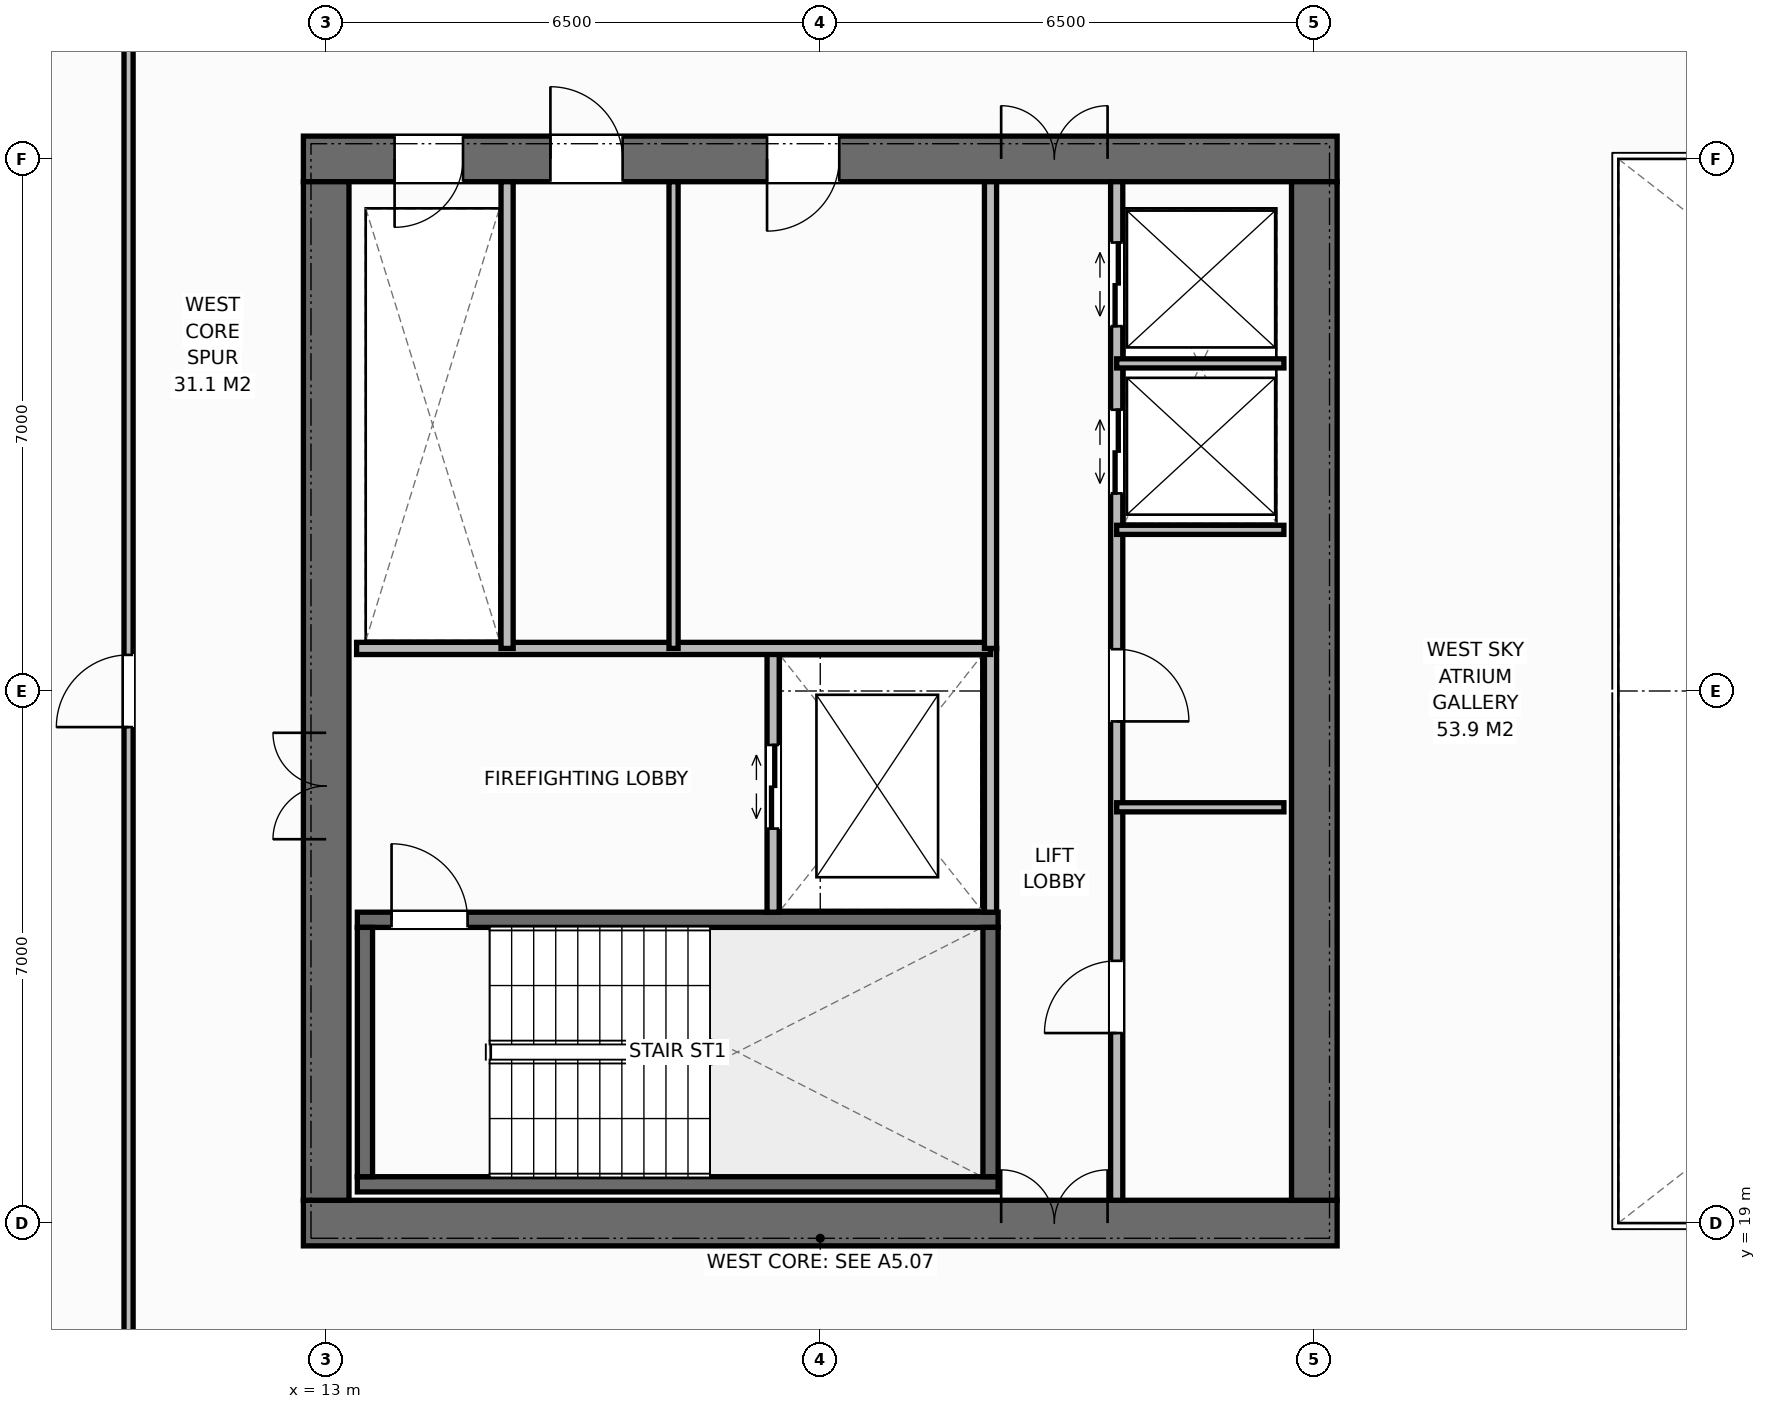
"""IFC4 building model, lengths in metres.
Left out: names, types, materials, properties, quantities, classifications, styles, units other than length and angle.
Written with IfcOpenShell. Run it as: python <this file> out.ifc"""

import sys

from ifc_helpers import new_model, si_unit, direction, frame, frame_2d, origin, place, context, subcontext, project, spatial, rectangle, extrude, element, fill, save


model = new_model("IFC4")
c1 = context("Model", 3, precision=1e-05, world=origin(), true_north=direction((0.0, 1.0)))
c2 = subcontext(c1, "Body", "Model", "MODEL_VIEW")
j1 = project(units=[si_unit("LENGTHUNIT", "METRE"), si_unit("PLANEANGLEUNIT", "RADIAN")], contexts=[c1])
p1 = place(None, origin())
s1 = spatial("IfcSite", under=j1, at=p1, CompositionType="ELEMENT")
p2 = place(p1, origin())
s2 = spatial("IfcBuilding", under=s1, at=p2, CompositionType="ELEMENT")
p3 = place(p2, frame((0.0, 0.0, 170.8)))
s3 = spatial("IfcBuildingStorey", under=s2, at=p3, CompositionType="ELEMENT", Elevation=170.8)
p4 = place(p3, frame((12.7, 19.0, 0.0), z_axis=(0.0, 0.0, 1.0), x_axis=(1.0, 0.0, 0.0)))
e1 = element("IfcWall", 1, at=p4, inside=s3, PredefinedType="SHEAR", context=c2, shape_type="SweptSolid", body=[
    extrude(rectangle(XDim=13.6, YDim=0.6, at=frame_2d((6.8, 0.0))), origin(), (0.0, 0.0, 1.0), 3.8),
])
p5 = place(p4, frame((9.18, 0.0, 0.0)))
e2 = element("IfcOpeningElement", 2, at=p5, cuts=e1, PredefinedType="OPENING", context=c2, shape_type="SweptSolid", body=[
    extrude(rectangle(XDim=1.4, YDim=2.2, at=frame_2d((0.7, 1.1))), frame((0.0, 0.31, 0.0), z_axis=(0.0, -1.0, 0.0), x_axis=(1.0, 0.0, 0.0)), (0.0, 0.0, 1.0), 0.62),
])
p6 = place(p3, frame((12.7, 33.0, 0.0), z_axis=(0.0, 0.0, 1.0), x_axis=(1.0, 0.0, 0.0)))
e3 = element("IfcWall", 3, at=p6, inside=s3, PredefinedType="SHEAR", context=c2, shape_type="SweptSolid", body=[
    extrude(rectangle(XDim=13.6, YDim=0.6, at=frame_2d((6.8, 0.0))), origin(), (0.0, 0.0, 1.0), 3.8),
])
p7 = place(p6, frame((1.2, 0.0, 0.0)))
e4 = element("IfcOpeningElement", 4, at=p7, cuts=e3, PredefinedType="OPENING", context=c2, shape_type="SweptSolid", body=[
    extrude(rectangle(XDim=0.9, YDim=2.15, at=frame_2d((0.45, 1.075))), frame((0.0, 0.31, 0.0), z_axis=(0.0, -1.0, 0.0), x_axis=(1.0, 0.0, 0.0)), (0.0, 0.0, 1.0), 0.62),
])
p8 = place(p6, frame((3.25, 0.0, 0.0)))
e5 = element("IfcOpeningElement", 5, at=p8, cuts=e3, PredefinedType="OPENING", context=c2, shape_type="SweptSolid", body=[
    extrude(rectangle(XDim=0.95, YDim=2.15, at=frame_2d((0.475, 1.075))), frame((0.0, 0.31, 0.0), z_axis=(0.0, -1.0, 0.0), x_axis=(1.0, 0.0, 0.0)), (0.0, 0.0, 1.0), 0.62),
])
p9 = place(p6, frame((6.1, 0.0, 0.0)))
e6 = element("IfcOpeningElement", 6, at=p9, cuts=e3, PredefinedType="OPENING", context=c2, shape_type="SweptSolid", body=[
    extrude(rectangle(XDim=0.95, YDim=2.15, at=frame_2d((0.475, 1.075))), frame((0.0, 0.31, 0.0), z_axis=(0.0, -1.0, 0.0), x_axis=(1.0, 0.0, 0.0)), (0.0, 0.0, 1.0), 0.62),
])
p10 = place(p6, frame((9.18, 0.0, 0.0)))
e7 = element("IfcOpeningElement", 7, at=p10, cuts=e3, PredefinedType="OPENING", context=c2, shape_type="SweptSolid", body=[
    extrude(rectangle(XDim=1.4, YDim=2.2, at=frame_2d((0.7, 1.1))), frame((0.0, 0.31, 0.0), z_axis=(0.0, -1.0, 0.0), x_axis=(1.0, 0.0, 0.0)), (0.0, 0.0, 1.0), 0.62),
])
p11 = place(p3, frame((13.0, 19.3, 0.0), z_axis=(0.0, 0.0, 1.0), x_axis=(0.0, 1.0, 0.0)))
e8 = element("IfcWall", 8, at=p11, inside=s3, PredefinedType="SHEAR", context=c2, shape_type="SweptSolid", body=[
    extrude(rectangle(XDim=13.4, YDim=0.6, at=frame_2d((6.7, 0.0))), origin(), (0.0, 0.0, 1.0), 3.8),
])
p12 = place(p11, frame((4.75, 0.0, 0.0)))
e9 = element("IfcOpeningElement", 9, at=p12, cuts=e8, PredefinedType="OPENING", context=c2, shape_type="SweptSolid", body=[
    extrude(rectangle(XDim=1.4, YDim=2.2, at=frame_2d((0.7, 1.1))), frame((0.0, 0.31, 0.0), z_axis=(0.0, -1.0, 0.0), x_axis=(1.0, 0.0, 0.0)), (0.0, 0.0, 1.0), 0.62),
])
p13 = place(p3, frame((26.0, 19.3, 0.0), z_axis=(0.0, 0.0, 1.0), x_axis=(0.0, 1.0, 0.0)))
e10 = element("IfcWall", 10, at=p13, inside=s3, PredefinedType="SHEAR", context=c2, shape_type="SweptSolid", body=[
    extrude(rectangle(XDim=13.4, YDim=0.6, at=frame_2d((6.7, 0.0))), origin(), (0.0, 0.0, 1.0), 3.8),
])
p14 = place(p3, frame((13.41, 19.51, 0.0), z_axis=(0.0, 0.0, 1.0), x_axis=(1.0, 0.0, 0.0)))
e11 = element("IfcWall", 11, at=p14, inside=s3, PredefinedType="SHEAR", context=c2, shape_type="SweptSolid", body=[
    extrude(rectangle(XDim=8.43, YDim=0.2, at=frame_2d((4.215, 0.0))), origin(), (0.0, 0.0, 1.0), 3.8),
])
p15 = place(p3, frame((13.41, 22.99, 0.0), z_axis=(0.0, 0.0, 1.0), x_axis=(1.0, 0.0, 0.0)))
e12 = element("IfcWall", 12, at=p15, inside=s3, PredefinedType="SHEAR", context=c2, shape_type="SweptSolid", body=[
    extrude(rectangle(XDim=8.43, YDim=0.2, at=frame_2d((4.215, 0.0))), origin(), (0.0, 0.0, 1.0), 3.8),
])
p16 = place(p15, frame((0.45, 0.0, 0.0)))
e13 = element("IfcOpeningElement", 13, at=p16, cuts=e12, PredefinedType="OPENING", context=c2, shape_type="SweptSolid", body=[
    extrude(rectangle(XDim=1.0, YDim=2.15, at=frame_2d((0.5, 1.075))), frame((0.0, 0.11, 0.0), z_axis=(0.0, -1.0, 0.0), x_axis=(1.0, 0.0, 0.0)), (0.0, 0.0, 1.0), 0.22),
])
for number, where, z_axis, x_axis in (
    (14, (13.51, 19.61, 0.0), (0.0, 0.0, 1.0), (0.0, 1.0, 0.0)),
    (15, (21.74, 19.61, 0.0), (0.0, 0.0, 1.0), (0.0, 1.0, 0.0)),
):
    element("IfcWall", number, at=place(p3, frame(where, z_axis=z_axis, x_axis=x_axis)), inside=s3, PredefinedType="SHEAR", context=c2, shape_type="SweptSolid", body=[
        extrude(rectangle(XDim=3.28, YDim=0.2, at=frame_2d((1.64, 0.0))), origin(), (0.0, 0.0, 1.0), 3.8),
    ])
p17 = place(p3, frame((21.74, 23.09, 0.0), z_axis=(0.0, 0.0, 1.0), x_axis=(0.0, 1.0, 0.0)))
e16 = element("IfcWall", 16, at=p17, inside=s3, PredefinedType="STANDARD", context=c2, shape_type="SweptSolid", body=[
    extrude(rectangle(XDim=3.47, YDim=0.16, at=frame_2d((1.735, 0.0))), origin(), (0.0, 0.0, 1.0), 3.572),
])
p18 = place(p3, frame((18.88, 23.09, 0.0), z_axis=(0.0, 0.0, 1.0), x_axis=(0.0, 1.0, 0.0)))
e17 = element("IfcWall", 17, at=p18, inside=s3, PredefinedType="STANDARD", context=c2, shape_type="SweptSolid", body=[
    extrude(rectangle(XDim=3.47, YDim=0.16, at=frame_2d((1.735, 0.0))), origin(), (0.0, 0.0, 1.0), 3.572),
])
p19 = place(p18, frame((1.1, 0.0, 0.0)))
e18 = element("IfcOpeningElement", 18, at=p19, cuts=e17, PredefinedType="OPENING", context=c2, shape_type="SweptSolid", body=[
    extrude(rectangle(XDim=1.1, YDim=2.2, at=frame_2d((0.55, 1.1))), frame((0.0, 0.09, 0.0), z_axis=(0.0, -1.0, 0.0), x_axis=(1.0, 0.0, 0.0)), (0.0, 0.0, 1.0), 0.18),
])
p20 = place(p3, frame((13.4, 26.56, 0.0), z_axis=(0.0, 0.0, 1.0), x_axis=(1.0, 0.0, 0.0)))
e19 = element("IfcWall", 19, at=p20, inside=s3, PredefinedType="STANDARD", context=c2, shape_type="SweptSolid", body=[
    extrude(rectangle(XDim=8.34, YDim=0.16, at=frame_2d((4.17, 0.0))), origin(), (0.0, 0.0, 1.0), 3.572),
])
p21 = place(p3, frame((15.38, 26.56, 0.0), z_axis=(0.0, 0.0, 1.0), x_axis=(0.0, 1.0, 0.0)))
e20 = element("IfcWall", 20, at=p21, inside=s3, PredefinedType="STANDARD", context=c2, shape_type="SweptSolid", body=[
    extrude(rectangle(XDim=6.14, YDim=0.16, at=frame_2d((3.07, 0.0))), origin(), (0.0, 0.0, 1.0), 3.572),
])
p22 = place(p3, frame((17.57, 26.56, 0.0), z_axis=(0.0, 0.0, 1.0), x_axis=(0.0, 1.0, 0.0)))
e21 = element("IfcWall", 21, at=p22, inside=s3, PredefinedType="PARTITIONING", context=c2, shape_type="SweptSolid", body=[
    extrude(rectangle(XDim=6.14, YDim=0.12, at=frame_2d((3.07, 0.0))), origin(), (0.0, 0.0, 1.0), 3.572),
])
p23 = place(p3, frame((21.74, 26.56, 0.0), z_axis=(0.0, 0.0, 1.0), x_axis=(0.0, 1.0, 0.0)))
e22 = element("IfcWall", 22, at=p23, inside=s3, PredefinedType="STANDARD", context=c2, shape_type="SweptSolid", body=[
    extrude(rectangle(XDim=6.14, YDim=0.16, at=frame_2d((3.07, 0.0))), origin(), (0.0, 0.0, 1.0), 3.572),
])
p24 = place(p3, frame((23.4, 19.3, 0.0), z_axis=(0.0, 0.0, 1.0), x_axis=(0.0, 1.0, 0.0)))
e23 = element("IfcWall", 23, at=p24, inside=s3, PredefinedType="STANDARD", context=c2, shape_type="SweptSolid", body=[
    extrude(rectangle(XDim=13.4, YDim=0.16, at=frame_2d((6.7, 0.0))), origin(), (0.0, 0.0, 1.0), 3.572),
])
p25 = place(p24, frame((2.2, 0.0, 0.0)))
e24 = element("IfcOpeningElement", 24, at=p25, cuts=e23, PredefinedType="OPENING", context=c2, shape_type="SweptSolid", body=[
    extrude(rectangle(XDim=0.95, YDim=2.15, at=frame_2d((0.475, 1.075))), frame((0.0, 0.09, 0.0), z_axis=(0.0, -1.0, 0.0), x_axis=(1.0, 0.0, 0.0)), (0.0, 0.0, 1.0), 0.18),
])
p26 = place(p24, frame((6.3, 0.0, 0.0)))
e25 = element("IfcOpeningElement", 25, at=p26, cuts=e23, PredefinedType="OPENING", context=c2, shape_type="SweptSolid", body=[
    extrude(rectangle(XDim=0.95, YDim=2.15, at=frame_2d((0.475, 1.075))), frame((0.0, 0.09, 0.0), z_axis=(0.0, -1.0, 0.0), x_axis=(1.0, 0.0, 0.0)), (0.0, 0.0, 1.0), 0.18),
])
p27 = place(p24, frame((9.3, 0.0, 0.0)))
e26 = element("IfcOpeningElement", 26, at=p27, cuts=e23, PredefinedType="OPENING", context=c2, shape_type="SweptSolid", body=[
    extrude(rectangle(XDim=1.1, YDim=2.2, at=frame_2d((0.55, 1.1))), frame((0.0, 0.09, 0.0), z_axis=(0.0, -1.0, 0.0), x_axis=(1.0, 0.0, 0.0)), (0.0, 0.0, 1.0), 0.18),
])
p28 = place(p24, frame((11.5, 0.0, 0.0)))
e27 = element("IfcOpeningElement", 27, at=p28, cuts=e23, PredefinedType="OPENING", context=c2, shape_type="SweptSolid", body=[
    extrude(rectangle(XDim=1.1, YDim=2.2, at=frame_2d((0.55, 1.1))), frame((0.0, 0.09, 0.0), z_axis=(0.0, -1.0, 0.0), x_axis=(1.0, 0.0, 0.0)), (0.0, 0.0, 1.0), 0.18),
])
for number, where, z_axis, x_axis in (
    (28, (23.4, 24.47, 0.0), (0.0, 0.0, 1.0), (1.0, 0.0, 0.0)),
    (29, (23.4, 28.12, 0.0), (0.0, 0.0, 1.0), (1.0, 0.0, 0.0)),
    (30, (23.4, 30.31, 0.0), (0.0, 0.0, 1.0), (1.0, 0.0, 0.0)),
):
    element("IfcWall", number, at=place(p3, frame(where, z_axis=z_axis, x_axis=x_axis)), inside=s3, PredefinedType="PARTITIONING", context=c2, shape_type="SweptSolid", body=[
        extrude(rectangle(XDim=2.2, YDim=0.12, at=frame_2d((1.1, 0.0))), origin(), (0.0, 0.0, 1.0), 3.572),
    ])
p29 = place(p3, frame((10.4, 16.5, 0.0), z_axis=(0.0, 0.0, 1.0), x_axis=(0.0, 1.0, 0.0)))
e31 = element("IfcWall", 31, at=p29, inside=s3, PredefinedType="PARTITIONING", context=c2, shape_type="SweptSolid", body=[
    extrude(rectangle(XDim=19.0, YDim=0.12, at=frame_2d((9.5, 0.0))), origin(), (0.0, 0.0, 1.0), 3.572),
])
p30 = place(p29, frame((9.025, 0.0, 0.0)))
e32 = element("IfcOpeningElement", 32, at=p30, cuts=e31, PredefinedType="OPENING", context=c2, shape_type="SweptSolid", body=[
    extrude(rectangle(XDim=0.95, YDim=2.15, at=frame_2d((0.475, 1.075))), frame((0.0, 0.07, 0.0), z_axis=(0.0, -1.0, 0.0), x_axis=(1.0, 0.0, 0.0)), (0.0, 0.0, 1.0), 0.14),
])
p31 = place(p16, origin())
e33 = element("IfcDoor", 33, at=p31, inside=s3, OperationType="SINGLE_SWING_LEFT", PredefinedType="DOOR", context=c2, shape_type="SweptSolid", body=[
    extrude(rectangle(XDim=1.0, YDim=2.15, at=frame_2d((0.5, 1.075))), frame((0.0, 0.025, 0.0), z_axis=(0.0, -1.0, 0.0), x_axis=(1.0, 0.0, 0.0)), (0.0, 0.0, 1.0), 0.05),
])
fill(e13, e33)
p32 = place(p12, origin())
e34 = element("IfcDoor", 34, at=p32, inside=s3, OperationType="DOUBLE_DOOR_SINGLE_SWING", PredefinedType="DOOR", context=c2, shape_type="SweptSolid", body=[
    extrude(rectangle(XDim=1.4, YDim=2.2, at=frame_2d((0.7, 1.1))), frame((0.0, 0.025, 0.0), z_axis=(0.0, -1.0, 0.0), x_axis=(1.0, 0.0, 0.0)), (0.0, 0.0, 1.0), 0.05),
])
fill(e9, e34)
p33 = place(p19, origin())
e35 = element("IfcDoor", 35, at=p33, inside=s3, OperationType="DOUBLE_DOOR_SLIDING", PredefinedType="DOOR", context=c2, shape_type="SweptSolid", body=[
    extrude(rectangle(XDim=1.1, YDim=2.2, at=frame_2d((0.55, 1.1))), frame((0.0, 0.025, 0.0), z_axis=(0.0, -1.0, 0.0), x_axis=(1.0, 0.0, 0.0)), (0.0, 0.0, 1.0), 0.05),
])
fill(e18, e35)
p34 = place(p7, origin())
e36 = element("IfcDoor", 36, at=p34, inside=s3, OperationType="SINGLE_SWING_RIGHT", PredefinedType="DOOR", context=c2, shape_type="SweptSolid", body=[
    extrude(rectangle(XDim=0.9, YDim=2.15, at=frame_2d((0.45, 1.075))), frame((0.0, -0.025, 0.0), z_axis=(0.0, -1.0, 0.0), x_axis=(1.0, 0.0, 0.0)), (0.0, 0.0, 1.0), 0.05),
])
fill(e4, e36)
p35 = place(p8, origin())
e37 = element("IfcDoor", 37, at=p35, inside=s3, OperationType="SINGLE_SWING_LEFT", PredefinedType="DOOR", context=c2, shape_type="SweptSolid", body=[
    extrude(rectangle(XDim=0.95, YDim=2.15, at=frame_2d((0.475, 1.075))), frame((0.0, -0.025, 0.0), z_axis=(0.0, -1.0, 0.0), x_axis=(1.0, 0.0, 0.0)), (0.0, 0.0, 1.0), 0.05),
])
fill(e5, e37)
p36 = place(p9, origin())
e38 = element("IfcDoor", 38, at=p36, inside=s3, OperationType="SINGLE_SWING_RIGHT", PredefinedType="DOOR", context=c2, shape_type="SweptSolid", body=[
    extrude(rectangle(XDim=0.95, YDim=2.15, at=frame_2d((0.475, 1.075))), frame((0.0, -0.025, 0.0), z_axis=(0.0, -1.0, 0.0), x_axis=(1.0, 0.0, 0.0)), (0.0, 0.0, 1.0), 0.05),
])
fill(e6, e38)
p37 = place(p5, origin())
e39 = element("IfcDoor", 39, at=p37, inside=s3, OperationType="DOUBLE_DOOR_SINGLE_SWING", PredefinedType="DOOR", context=c2, shape_type="SweptSolid", body=[
    extrude(rectangle(XDim=1.4, YDim=2.2, at=frame_2d((0.7, 1.1))), frame((0.0, 0.075, 0.0), z_axis=(0.0, -1.0, 0.0), x_axis=(1.0, 0.0, 0.0)), (0.0, 0.0, 1.0), 0.05),
])
fill(e2, e39)
p38 = place(p10, origin())
e40 = element("IfcDoor", 40, at=p38, inside=s3, OperationType="DOUBLE_DOOR_SINGLE_SWING", PredefinedType="DOOR", context=c2, shape_type="SweptSolid", body=[
    extrude(rectangle(XDim=1.4, YDim=2.2, at=frame_2d((0.7, 1.1))), frame((0.0, -0.025, 0.0), z_axis=(0.0, -1.0, 0.0), x_axis=(1.0, 0.0, 0.0)), (0.0, 0.0, 1.0), 0.05),
])
fill(e7, e40)
p39 = place(p25, origin())
e41 = element("IfcDoor", 41, at=p39, inside=s3, OperationType="SINGLE_SWING_LEFT", PredefinedType="DOOR", context=c2, shape_type="SweptSolid", body=[
    extrude(rectangle(XDim=0.95, YDim=2.15, at=frame_2d((0.475, 1.075))), frame((0.0, 0.025, 0.0), z_axis=(0.0, -1.0, 0.0), x_axis=(1.0, 0.0, 0.0)), (0.0, 0.0, 1.0), 0.05),
])
fill(e24, e41)
p40 = place(p26, origin())
e42 = element("IfcDoor", 42, at=p40, inside=s3, OperationType="SINGLE_SWING_RIGHT", PredefinedType="DOOR", context=c2, shape_type="SweptSolid", body=[
    extrude(rectangle(XDim=0.95, YDim=2.15, at=frame_2d((0.475, 1.075))), frame((0.0, 0.025, 0.0), z_axis=(0.0, -1.0, 0.0), x_axis=(1.0, 0.0, 0.0)), (0.0, 0.0, 1.0), 0.05),
])
fill(e25, e42)
p41 = place(p27, origin())
e43 = element("IfcDoor", 43, at=p41, inside=s3, OperationType="DOUBLE_DOOR_SLIDING", PredefinedType="DOOR", context=c2, shape_type="SweptSolid", body=[
    extrude(rectangle(XDim=1.1, YDim=2.2, at=frame_2d((0.55, 1.1))), frame((0.0, 0.025, 0.0), z_axis=(0.0, -1.0, 0.0), x_axis=(1.0, 0.0, 0.0)), (0.0, 0.0, 1.0), 0.05),
])
fill(e26, e43)
p42 = place(p28, origin())
e44 = element("IfcDoor", 44, at=p42, inside=s3, OperationType="DOUBLE_DOOR_SLIDING", PredefinedType="DOOR", context=c2, shape_type="SweptSolid", body=[
    extrude(rectangle(XDim=1.1, YDim=2.2, at=frame_2d((0.55, 1.1))), frame((0.0, 0.025, 0.0), z_axis=(0.0, -1.0, 0.0), x_axis=(1.0, 0.0, 0.0)), (0.0, 0.0, 1.0), 0.05),
])
fill(e27, e44)
p43 = place(p30, origin())
e45 = element("IfcDoor", 45, at=p43, inside=s3, OperationType="SINGLE_SWING_LEFT", PredefinedType="DOOR", context=c2, shape_type="SweptSolid", body=[
    extrude(rectangle(XDim=0.95, YDim=2.15, at=frame_2d((0.475, 1.075))), frame((0.0, 0.025, 0.0), z_axis=(0.0, -1.0, 0.0), x_axis=(1.0, 0.0, 0.0)), (0.0, 0.0, 1.0), 0.05),
])
fill(e32, e45)
save(model, sys.argv[1])
